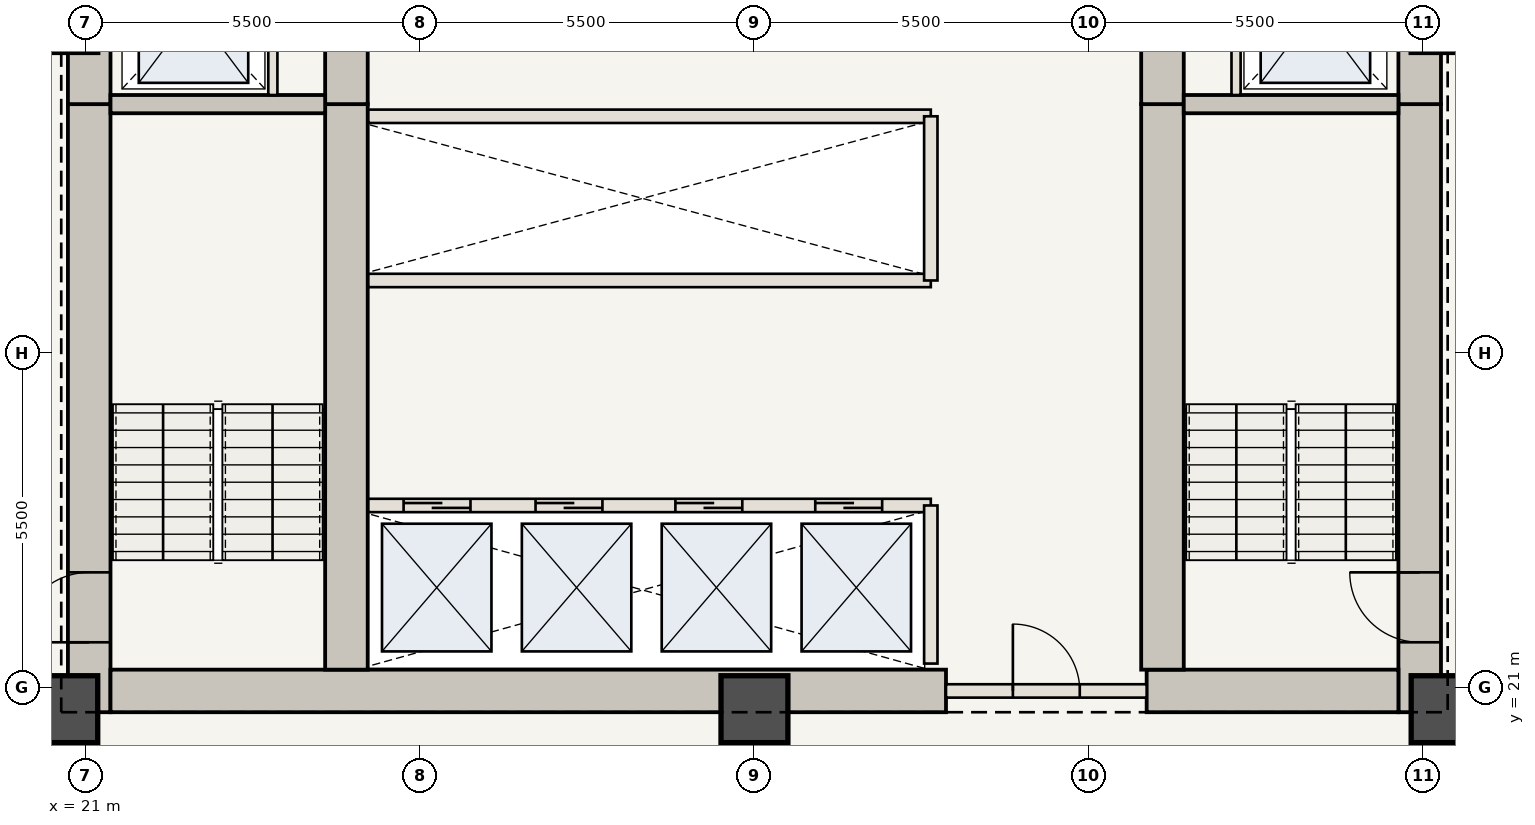
"""IFC4 building model, lengths in metres.
Left out: names, types, materials, properties, quantities, classifications, styles, units other than length and angle.
Written with IfcOpenShell. Run it as: python <this file> out.ifc"""

import sys

from ifc_helpers import new_model, si_unit, direction, frame, frame_2d, origin, origin_2d, place, context, subcontext, project, spatial, rectangle, extrude, element, fill, save


model = new_model("IFC4")
c1 = context("Model", 3, precision=1e-05, world=origin(), true_north=direction((0.0, 1.0)))
c2 = subcontext(c1, "Body", "Model", "MODEL_VIEW")
j1 = project(units=[si_unit("LENGTHUNIT", "METRE"), si_unit("PLANEANGLEUNIT", "RADIAN")], contexts=[c1])
p1 = place(None, origin())
s1 = spatial("IfcSite", under=j1, at=p1, CompositionType="ELEMENT")
p2 = place(p1, origin())
s2 = spatial("IfcBuilding", under=s1, at=p2, CompositionType="ELEMENT")
p3 = place(p2, frame((0.0, 0.0, 38.85)))
s3 = spatial("IfcBuildingStorey", under=s2, at=p3, CompositionType="ELEMENT", Elevation=38.85)
p4 = place(p3, frame((21.06, 20.6, 0.0), z_axis=(0.0, 0.0, 1.0), x_axis=(0.0, 1.0, 0.0)))
e1 = element("IfcWall", 1, at=p4, inside=s3, PredefinedType="SHEAR", context=c2, shape_type="SweptSolid", body=[
    extrude(rectangle(XDim=10.0, YDim=0.7, at=frame_2d((5.0, 0.0))), origin(), (0.0, 0.0, 1.0), 3.5),
])
p5 = place(p4, frame((1.15, 0.0, 0.0)))
e2 = element("IfcOpeningElement", 2, at=p5, cuts=e1, PredefinedType="OPENING", context=c2, shape_type="SweptSolid", body=[
    extrude(rectangle(XDim=1.15, YDim=2.15, at=frame_2d((0.575, 1.075))), frame((0.0, 0.36, 0.0), z_axis=(0.0, -1.0, 0.0), x_axis=(1.0, 0.0, 0.0)), (0.0, 0.0, 1.0), 0.72),
])
p6 = place(p3, frame((21.06, 30.6, 0.0), z_axis=(0.0, 0.0, 1.0), x_axis=(0.0, 1.0, 0.0)))
e3 = element("IfcWall", 3, at=p6, inside=s3, PredefinedType="SHEAR", context=c2, shape_type="SweptSolid", body=[
    extrude(rectangle(XDim=12.75, YDim=0.7, at=frame_2d((6.375, 0.0))), origin(), (0.0, 0.0, 1.0), 3.5),
])
p7 = place(p6, frame((4.2, 0.0, 0.0)))
e4 = element("IfcOpeningElement", 4, at=p7, cuts=e3, PredefinedType="OPENING", context=c2, shape_type="SweptSolid", body=[
    extrude(rectangle(XDim=1.1, YDim=2.15, at=frame_2d((0.55, 1.075))), frame((0.0, 0.36, 0.0), z_axis=(0.0, -1.0, 0.0), x_axis=(1.0, 0.0, 0.0)), (0.0, 0.0, 1.0), 0.72),
])
p8 = place(p6, frame((9.2, 0.0, 0.0)))
e5 = element("IfcOpeningElement", 5, at=p8, cuts=e3, PredefinedType="OPENING", context=c2, shape_type="SweptSolid", body=[
    extrude(rectangle(XDim=0.92, YDim=2.1, at=frame_2d((0.46, 1.05))), frame((0.0, 0.36, 0.0), z_axis=(0.0, -1.0, 0.0), x_axis=(1.0, 0.0, 0.0)), (0.0, 0.0, 1.0), 0.72),
])
p9 = place(p3, frame((42.94, 20.6, 0.0), z_axis=(0.0, 0.0, 1.0), x_axis=(0.0, 1.0, 0.0)))
e6 = element("IfcWall", 6, at=p9, inside=s3, PredefinedType="SHEAR", context=c2, shape_type="SweptSolid", body=[
    extrude(rectangle(XDim=10.0, YDim=0.7, at=frame_2d((5.0, 0.0))), origin(), (0.0, 0.0, 1.0), 3.5),
])
p10 = place(p9, frame((1.15, 0.0, 0.0)))
e7 = element("IfcOpeningElement", 7, at=p10, cuts=e6, PredefinedType="OPENING", context=c2, shape_type="SweptSolid", body=[
    extrude(rectangle(XDim=1.15, YDim=2.15, at=frame_2d((0.575, 1.075))), frame((0.0, 0.36, 0.0), z_axis=(0.0, -1.0, 0.0), x_axis=(1.0, 0.0, 0.0)), (0.0, 0.0, 1.0), 0.72),
])
p11 = place(p3, frame((42.94, 30.6, 0.0), z_axis=(0.0, 0.0, 1.0), x_axis=(0.0, 1.0, 0.0)))
e8 = element("IfcWall", 8, at=p11, inside=s3, PredefinedType="SHEAR", context=c2, shape_type="SweptSolid", body=[
    extrude(rectangle(XDim=12.75, YDim=0.7, at=frame_2d((6.375, 0.0))), origin(), (0.0, 0.0, 1.0), 3.5),
])
p12 = place(p11, frame((4.2, 0.0, 0.0)))
e9 = element("IfcOpeningElement", 9, at=p12, cuts=e8, PredefinedType="OPENING", context=c2, shape_type="SweptSolid", body=[
    extrude(rectangle(XDim=1.1, YDim=2.15, at=frame_2d((0.55, 1.075))), frame((0.0, 0.36, 0.0), z_axis=(0.0, -1.0, 0.0), x_axis=(1.0, 0.0, 0.0)), (0.0, 0.0, 1.0), 0.72),
])
p13 = place(p11, frame((8.4, 0.0, 0.0)))
e10 = element("IfcOpeningElement", 10, at=p13, cuts=e8, PredefinedType="OPENING", context=c2, shape_type="SweptSolid", body=[
    extrude(rectangle(XDim=0.88, YDim=2.1, at=frame_2d((0.44, 1.05))), frame((0.0, 0.36, 0.0), z_axis=(0.0, -1.0, 0.0), x_axis=(1.0, 0.0, 0.0)), (0.0, 0.0, 1.0), 0.72),
])
p14 = place(p11, frame((10.5, 0.0, 0.0)))
e11 = element("IfcOpeningElement", 11, at=p14, cuts=e8, PredefinedType="OPENING", context=c2, shape_type="SweptSolid", body=[
    extrude(rectangle(XDim=0.88, YDim=2.1, at=frame_2d((0.44, 1.05))), frame((0.0, 0.36, 0.0), z_axis=(0.0, -1.0, 0.0), x_axis=(1.0, 0.0, 0.0)), (0.0, 0.0, 1.0), 0.72),
])
p15 = place(p3, frame((21.41, 20.95, 0.0), z_axis=(0.0, 0.0, 1.0), x_axis=(1.0, 0.0, 0.0)))
e12 = element("IfcWall", 12, at=p15, inside=s3, PredefinedType="SHEAR", context=c2, shape_type="SweptSolid", body=[
    extrude(rectangle(XDim=13.74, YDim=0.7, at=frame_2d((6.87, 0.0))), origin(), (0.0, 0.0, 1.0), 3.5),
])
p16 = place(p3, frame((38.45, 20.95, 0.0), z_axis=(0.0, 0.0, 1.0), x_axis=(1.0, 0.0, 0.0)))
e13 = element("IfcWall", 13, at=p16, inside=s3, PredefinedType="SHEAR", context=c2, shape_type="SweptSolid", body=[
    extrude(rectangle(XDim=4.14, YDim=0.7, at=frame_2d((2.07, 0.0))), origin(), (0.0, 0.0, 1.0), 3.5),
])
p17 = place(p3, frame((25.29, 21.3, 0.0), z_axis=(0.0, 0.0, 1.0), x_axis=(0.0, 1.0, 0.0)))
e14 = element("IfcWall", 14, at=p17, inside=s3, PredefinedType="SHEAR", context=c2, shape_type="SweptSolid", body=[
    extrude(rectangle(XDim=9.3, YDim=0.7, at=frame_2d((4.65, 0.0))), origin(), (0.0, 0.0, 1.0), 3.5),
])
p18 = place(p3, frame((25.29, 30.6, 0.0), z_axis=(0.0, 0.0, 1.0), x_axis=(0.0, 1.0, 0.0)))
e15 = element("IfcWall", 15, at=p18, inside=s3, PredefinedType="SHEAR", context=c2, shape_type="SweptSolid", body=[
    extrude(rectangle(XDim=12.05, YDim=0.7, at=frame_2d((6.025, 0.0))), origin(), (0.0, 0.0, 1.0), 3.5),
])
p19 = place(p18, frame((6.25, 0.0, 0.0)))
e16 = element("IfcOpeningElement", 16, at=p19, cuts=e15, PredefinedType="OPENING", context=c2, shape_type="SweptSolid", body=[
    extrude(rectangle(XDim=1.1, YDim=2.15, at=frame_2d((0.55, 1.075))), frame((0.0, 0.36, 0.0), z_axis=(0.0, -1.0, 0.0), x_axis=(1.0, 0.0, 0.0)), (0.0, 0.0, 1.0), 0.72),
])
p20 = place(p3, frame((38.71, 21.3, 0.0), z_axis=(0.0, 0.0, 1.0), x_axis=(0.0, 1.0, 0.0)))
e17 = element("IfcWall", 17, at=p20, inside=s3, PredefinedType="SHEAR", context=c2, shape_type="SweptSolid", body=[
    extrude(rectangle(XDim=9.3, YDim=0.7, at=frame_2d((4.65, 0.0))), origin(), (0.0, 0.0, 1.0), 3.5),
])
p21 = place(p3, frame((38.71, 30.6, 0.0), z_axis=(0.0, 0.0, 1.0), x_axis=(0.0, 1.0, 0.0)))
e18 = element("IfcWall", 18, at=p21, inside=s3, PredefinedType="SHEAR", context=c2, shape_type="SweptSolid", body=[
    extrude(rectangle(XDim=12.05, YDim=0.7, at=frame_2d((6.025, 0.0))), origin(), (0.0, 0.0, 1.0), 3.5),
])
for number, where, z_axis, x_axis in (
    (19, (20.65, 20.65, 0.0), (0.0, 0.0, 1.0), (1.0, 0.0, 0.0)),
    (20, (32.0, 20.65, 0.0), (0.0, 0.0, 1.0), (1.0, 0.0, 0.0)),
    (21, (43.35, 20.65, 0.0), (0.0, 0.0, 1.0), (1.0, 0.0, 0.0)),
):
    element("IfcColumn", number, at=place(p3, frame(where, z_axis=z_axis, x_axis=x_axis)), inside=s3, PredefinedType="COLUMN", context=c2, shape_type="SweptSolid", body=[
        extrude(rectangle(XDim=1.1, YDim=1.1, at=origin_2d()), origin(), (0.0, 0.0, 1.0), 3.5),
    ])
for number, where, z_axis, x_axis in (
    (22, (21.41, 30.6, 0.0), (0.0, 0.0, 1.0), (1.0, 0.0, 0.0)),
    (23, (39.06, 30.6, 0.0), (0.0, 0.0, 1.0), (1.0, 0.0, 0.0)),
):
    element("IfcWall", number, at=place(p3, frame(where, z_axis=z_axis, x_axis=x_axis)), inside=s3, PredefinedType="SHEAR", context=c2, shape_type="SweptSolid", body=[
        extrude(rectangle(XDim=3.53, YDim=0.3, at=frame_2d((1.765, 0.0))), origin(), (0.0, 0.0, 1.0), 3.08),
    ])
for number, where, z_axis, x_axis in (
    (24, (24.08, 30.75, 0.0), (0.0, 0.0, 1.0), (0.0, 1.0, 0.0)),
    (25, (39.92, 30.75, 0.0), (0.0, 0.0, 1.0), (0.0, 1.0, 0.0)),
):
    element("IfcWall", number, at=place(p3, frame(where, z_axis=z_axis, x_axis=x_axis)), inside=s3, PredefinedType="STANDARD", context=c2, shape_type="SweptSolid", body=[
        extrude(rectangle(XDim=2.65, YDim=0.15, at=frame_2d((1.325, 0.0))), origin(), (0.0, 0.0, 1.0), 3.08),
    ])
p22 = place(p3, frame((35.15, 20.95, 0.0), z_axis=(0.0, 0.0, 1.0), x_axis=(1.0, 0.0, 0.0)))
e26 = element("IfcWall", 26, at=p22, inside=s3, PredefinedType="STANDARD", context=c2, shape_type="SweptSolid", body=[
    extrude(rectangle(XDim=3.3, YDim=0.22, at=frame_2d((1.65, 0.0))), origin(), (0.0, 0.0, 1.0), 3.08),
])
p23 = place(p22, frame((1.1, 0.0, 0.0)))
e27 = element("IfcOpeningElement", 27, at=p23, cuts=e26, PredefinedType="OPENING", context=c2, shape_type="SweptSolid", body=[
    extrude(rectangle(XDim=1.1, YDim=2.15, at=frame_2d((0.55, 1.075))), frame((0.0, 0.12, 0.0), z_axis=(0.0, -1.0, 0.0), x_axis=(1.0, 0.0, 0.0)), (0.0, 0.0, 1.0), 0.24),
])
p24 = place(p3, frame((25.65, 24.0, 0.0), z_axis=(0.0, 0.0, 1.0), x_axis=(1.0, 0.0, 0.0)))
e28 = element("IfcWall", 28, at=p24, inside=s3, PredefinedType="STANDARD", context=c2, shape_type="SweptSolid", body=[
    extrude(rectangle(XDim=9.25, YDim=0.22, at=frame_2d((4.625, 0.0))), origin(), (0.0, 0.0, 1.0), 3.08),
])
p25 = place(p24, frame((0.58, 0.0, 0.0)))
e29 = element("IfcOpeningElement", 29, at=p25, cuts=e28, PredefinedType="OPENING", context=c2, shape_type="SweptSolid", body=[
    extrude(rectangle(XDim=1.1, YDim=2.15, at=frame_2d((0.55, 1.075))), frame((0.0, 0.12, 0.0), z_axis=(0.0, -1.0, 0.0), x_axis=(1.0, 0.0, 0.0)), (0.0, 0.0, 1.0), 0.24),
])
p26 = place(p24, frame((2.75, 0.0, 0.0)))
e30 = element("IfcOpeningElement", 30, at=p26, cuts=e28, PredefinedType="OPENING", context=c2, shape_type="SweptSolid", body=[
    extrude(rectangle(XDim=1.1, YDim=2.15, at=frame_2d((0.55, 1.075))), frame((0.0, 0.12, 0.0), z_axis=(0.0, -1.0, 0.0), x_axis=(1.0, 0.0, 0.0)), (0.0, 0.0, 1.0), 0.24),
])
p27 = place(p24, frame((5.05, 0.0, 0.0)))
e31 = element("IfcOpeningElement", 31, at=p27, cuts=e28, PredefinedType="OPENING", context=c2, shape_type="SweptSolid", body=[
    extrude(rectangle(XDim=1.1, YDim=2.15, at=frame_2d((0.55, 1.075))), frame((0.0, 0.12, 0.0), z_axis=(0.0, -1.0, 0.0), x_axis=(1.0, 0.0, 0.0)), (0.0, 0.0, 1.0), 0.24),
])
p28 = place(p24, frame((7.35, 0.0, 0.0)))
e32 = element("IfcOpeningElement", 32, at=p28, cuts=e28, PredefinedType="OPENING", context=c2, shape_type="SweptSolid", body=[
    extrude(rectangle(XDim=1.1, YDim=2.15, at=frame_2d((0.55, 1.075))), frame((0.0, 0.12, 0.0), z_axis=(0.0, -1.0, 0.0), x_axis=(1.0, 0.0, 0.0)), (0.0, 0.0, 1.0), 0.24),
])
p29 = place(p3, frame((34.9, 21.4, 0.0), z_axis=(0.0, 0.0, 1.0), x_axis=(0.0, 1.0, 0.0)))
e33 = element("IfcWall", 33, at=p29, inside=s3, PredefinedType="STANDARD", context=c2, shape_type="SweptSolid", body=[
    extrude(rectangle(XDim=2.6, YDim=0.22, at=frame_2d((1.3, 0.0))), origin(), (0.0, 0.0, 1.0), 3.08),
])
for number, where, z_axis, x_axis in (
    (34, (25.65, 27.7, 0.0), (0.0, 0.0, 1.0), (1.0, 0.0, 0.0)),
    (35, (25.65, 30.4, 0.0), (0.0, 0.0, 1.0), (1.0, 0.0, 0.0)),
):
    element("IfcWall", number, at=place(p3, frame(where, z_axis=z_axis, x_axis=x_axis)), inside=s3, PredefinedType="STANDARD", context=c2, shape_type="SweptSolid", body=[
        extrude(rectangle(XDim=9.25, YDim=0.22, at=frame_2d((4.625, 0.0))), origin(), (0.0, 0.0, 1.0), 3.08),
    ])
p30 = place(p3, frame((34.9, 27.7, 0.0), z_axis=(0.0, 0.0, 1.0), x_axis=(0.0, 1.0, 0.0)))
e36 = element("IfcWall", 36, at=p30, inside=s3, PredefinedType="STANDARD", context=c2, shape_type="SweptSolid", body=[
    extrude(rectangle(XDim=2.7, YDim=0.22, at=frame_2d((1.35, 0.0))), origin(), (0.0, 0.0, 1.0), 3.08),
])
p31 = place(p5, origin())
e37 = element("IfcDoor", 37, at=p31, inside=s3, OperationType="SINGLE_SWING_LEFT", PredefinedType="DOOR", context=c2, shape_type="SweptSolid", body=[
    extrude(rectangle(XDim=1.15, YDim=2.15, at=frame_2d((0.575, 1.075))), frame((0.0, 0.025, 0.0), z_axis=(0.0, -1.0, 0.0), x_axis=(1.0, 0.0, 0.0)), (0.0, 0.0, 1.0), 0.05),
])
fill(e2, e37)
p32 = place(p10, origin())
e38 = element("IfcDoor", 38, at=p32, inside=s3, OperationType="SINGLE_SWING_RIGHT", PredefinedType="DOOR", context=c2, shape_type="SweptSolid", body=[
    extrude(rectangle(XDim=1.15, YDim=2.15, at=frame_2d((0.575, 1.075))), frame((0.0, 0.025, 0.0), z_axis=(0.0, -1.0, 0.0), x_axis=(1.0, 0.0, 0.0)), (0.0, 0.0, 1.0), 0.05),
])
fill(e7, e38)
p33 = place(p23, origin())
e39 = element("IfcDoor", 39, at=p33, inside=s3, OperationType="SINGLE_SWING_LEFT", PredefinedType="DOOR", context=c2, shape_type="SweptSolid", body=[
    extrude(rectangle(XDim=1.1, YDim=2.15, at=frame_2d((0.55, 1.075))), frame((0.0, 0.025, 0.0), z_axis=(0.0, -1.0, 0.0), x_axis=(1.0, 0.0, 0.0)), (0.0, 0.0, 1.0), 0.05),
])
fill(e27, e39)
p34 = place(p25, origin())
e40 = element("IfcDoor", 40, at=p34, inside=s3, OperationType="DOUBLE_DOOR_SLIDING", PredefinedType="DOOR", context=c2, shape_type="SweptSolid", body=[
    extrude(rectangle(XDim=1.1, YDim=2.15, at=frame_2d((0.55, 1.075))), frame((0.0, 0.025, 0.0), z_axis=(0.0, -1.0, 0.0), x_axis=(1.0, 0.0, 0.0)), (0.0, 0.0, 1.0), 0.05),
])
fill(e29, e40)
p35 = place(p26, origin())
e41 = element("IfcDoor", 41, at=p35, inside=s3, OperationType="DOUBLE_DOOR_SLIDING", PredefinedType="DOOR", context=c2, shape_type="SweptSolid", body=[
    extrude(rectangle(XDim=1.1, YDim=2.15, at=frame_2d((0.55, 1.075))), frame((0.0, 0.025, 0.0), z_axis=(0.0, -1.0, 0.0), x_axis=(1.0, 0.0, 0.0)), (0.0, 0.0, 1.0), 0.05),
])
fill(e30, e41)
p36 = place(p27, origin())
e42 = element("IfcDoor", 42, at=p36, inside=s3, OperationType="DOUBLE_DOOR_SLIDING", PredefinedType="DOOR", context=c2, shape_type="SweptSolid", body=[
    extrude(rectangle(XDim=1.1, YDim=2.15, at=frame_2d((0.55, 1.075))), frame((0.0, 0.025, 0.0), z_axis=(0.0, -1.0, 0.0), x_axis=(1.0, 0.0, 0.0)), (0.0, 0.0, 1.0), 0.05),
])
fill(e31, e42)
p37 = place(p28, origin())
e43 = element("IfcDoor", 43, at=p37, inside=s3, OperationType="DOUBLE_DOOR_SLIDING", PredefinedType="DOOR", context=c2, shape_type="SweptSolid", body=[
    extrude(rectangle(XDim=1.1, YDim=2.15, at=frame_2d((0.55, 1.075))), frame((0.0, 0.025, 0.0), z_axis=(0.0, -1.0, 0.0), x_axis=(1.0, 0.0, 0.0)), (0.0, 0.0, 1.0), 0.05),
])
fill(e32, e43)
save(model, sys.argv[1])
